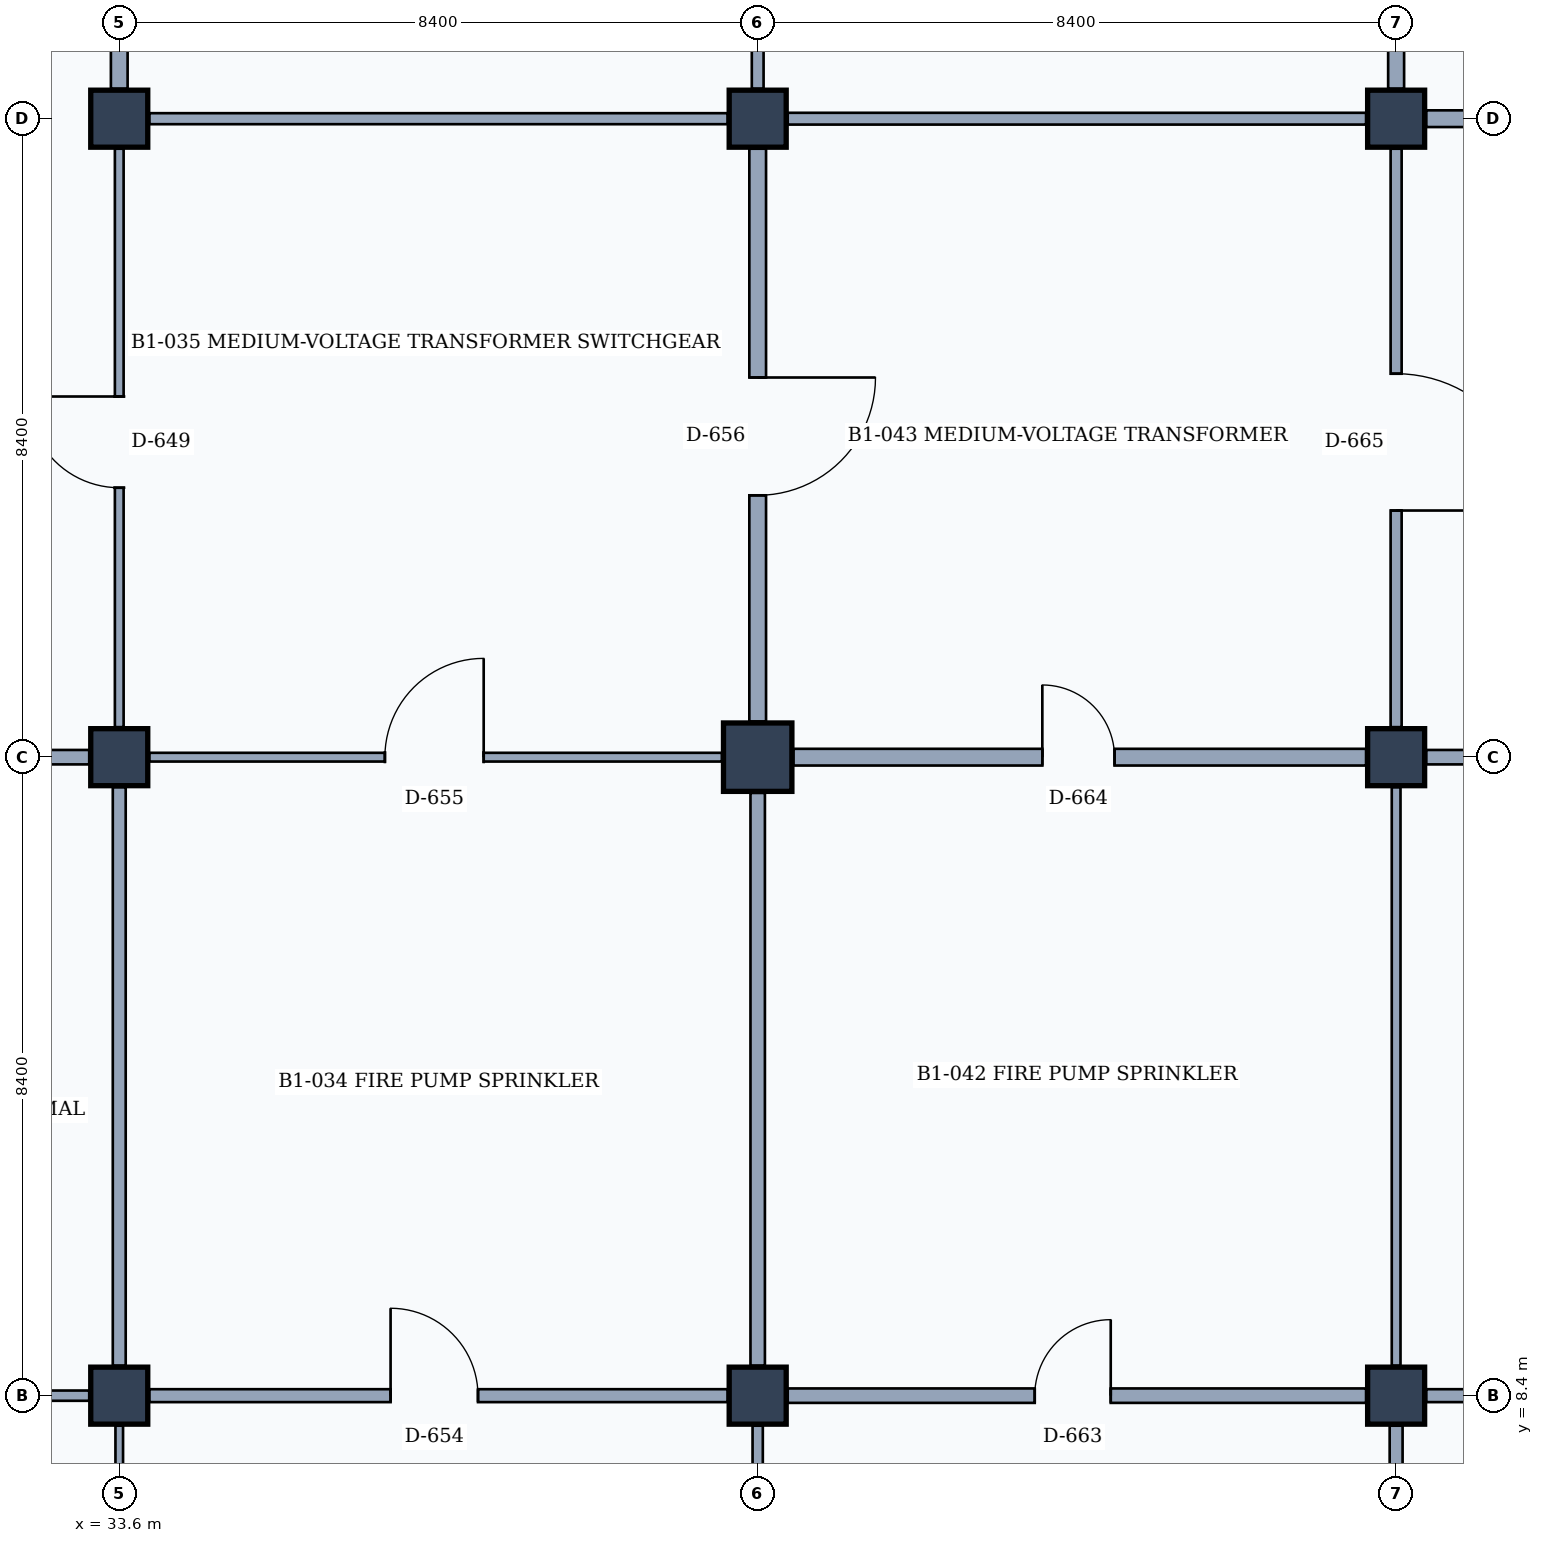
"""IFC4 building model, lengths in metres.
Left out: names, types, materials, properties, quantities, classifications, styles, units other than length and angle.
Written with IfcOpenShell. Run it as: python <this file> out.ifc"""

import sys

from ifc_helpers import new_model, si_unit, direction, frame, frame_2d, origin, origin_2d, place, context, subcontext, project, spatial, rectangle, extrude, element, fill, save


model = new_model("IFC4")
c1 = context("Model", 3, precision=1e-05, world=origin(), true_north=direction((0.0, 1.0)))
c2 = subcontext(c1, "Body", "Model", "MODEL_VIEW")
j1 = project(units=[si_unit("LENGTHUNIT", "METRE"), si_unit("PLANEANGLEUNIT", "RADIAN")], contexts=[c1])
p1 = place(None, origin())
s1 = spatial("IfcSite", under=j1, at=p1, CompositionType="ELEMENT")
p2 = place(p1, origin())
s2 = spatial("IfcBuilding", under=s1, at=p2, CompositionType="ELEMENT")
p3 = place(p2, frame((0.0, 0.0, -4.2)))
s3 = spatial("IfcBuildingStorey", under=s2, at=p3, CompositionType="ELEMENT", Elevation=-4.2)
for number, where, z_axis, x_axis in (
    (1, (33.6, 8.4, 0.0), (0.0, 0.0, 1.0), (1.0, 0.0, 0.0)),
    (2, (33.6, 16.8, 0.0), (0.0, 0.0, 1.0), (1.0, 0.0, 0.0)),
    (3, (33.6, 25.2, 0.0), (0.0, 0.0, 1.0), (1.0, 0.0, 0.0)),
    (4, (42.0, 8.4, 0.0), (0.0, 0.0, 1.0), (1.0, 0.0, 0.0)),
):
    element("IfcColumn", number, at=place(p3, frame(where, z_axis=z_axis, x_axis=x_axis)), inside=s3, PredefinedType="COLUMN", context=c2, shape_type="SweptSolid", body=[
        extrude(rectangle(XDim=0.75, YDim=0.75, at=origin_2d()), origin(), (0.0, 0.0, 1.0), 4.2),
    ])
p4 = place(p3, frame((42.0, 16.8, 0.0), z_axis=(0.0, 0.0, 1.0), x_axis=(1.0, 0.0, 0.0)))
e5 = element("IfcColumn", 5, at=p4, inside=s3, PredefinedType="COLUMN", context=c2, shape_type="SweptSolid", body=[
    extrude(rectangle(XDim=0.9, YDim=0.9, at=origin_2d()), origin(), (0.0, 0.0, 1.0), 4.2),
])
for number, where, z_axis, x_axis in (
    (6, (42.0, 25.2, 0.0), (0.0, 0.0, 1.0), (1.0, 0.0, 0.0)),
    (7, (50.4, 8.4, 0.0), (0.0, 0.0, 1.0), (1.0, 0.0, 0.0)),
    (8, (50.4, 16.8, 0.0), (0.0, 0.0, 1.0), (1.0, 0.0, 0.0)),
    (9, (50.4, 25.2, 0.0), (0.0, 0.0, 1.0), (1.0, 0.0, 0.0)),
):
    element("IfcColumn", number, at=place(p3, frame(where, z_axis=z_axis, x_axis=x_axis)), inside=s3, PredefinedType="COLUMN", context=c2, shape_type="SweptSolid", body=[
        extrude(rectangle(XDim=0.75, YDim=0.75, at=origin_2d()), origin(), (0.0, 0.0, 1.0), 4.2),
    ])
p5 = place(p3, frame((33.6, 0.345, 0.0), z_axis=(0.0, 0.0, 1.0), x_axis=(0.0, 1.0, 0.0)))
e10 = element("IfcWall", 10, at=p5, inside=s3, PredefinedType="MOVABLE", context=c2, shape_type="SweptSolid", body=[
    extrude(rectangle(XDim=7.66, YDim=0.1, at=frame_2d((3.83, 0.0))), origin(), (0.0, 0.0, 1.0), 3.25),
])
p6 = place(p3, frame((25.595, 8.4, 0.0), z_axis=(0.0, 0.0, 1.0), x_axis=(1.0, 0.0, 0.0)))
e11 = element("IfcWall", 11, at=p6, inside=s3, PredefinedType="PARTITIONING", context=c2, shape_type="SweptSolid", body=[
    extrude(rectangle(XDim=7.61, YDim=0.135, at=frame_2d((3.805, 0.0))), origin(), (0.0, 0.0, 1.0), 3.05),
])
p7 = place(p6, frame((3.275, 0.0, 0.0)))
e12 = element("IfcOpeningElement", 12, at=p7, cuts=e11, PredefinedType="OPENING", context=c2, shape_type="SweptSolid", body=[
    extrude(rectangle(XDim=0.95, YDim=2.15, at=frame_2d((0.475, 1.075))), frame((0.0, 0.077, 0.0), z_axis=(0.0, -1.0, 0.0), x_axis=(1.0, 0.0, 0.0)), (0.0, 0.0, 1.0), 0.155),
])
p8 = place(p3, frame((33.6, 8.795, 0.0), z_axis=(0.0, 0.0, 1.0), x_axis=(0.0, 1.0, 0.0)))
e13 = element("IfcWall", 13, at=p8, inside=s3, PredefinedType="PARTITIONING", context=c2, shape_type="SweptSolid", body=[
    extrude(rectangle(XDim=7.61, YDim=0.17, at=frame_2d((3.805, 0.0))), origin(), (0.0, 0.0, 1.0), 3.25),
])
p9 = place(p3, frame((25.67, 16.8, 0.0), z_axis=(0.0, 0.0, 1.0), x_axis=(1.0, 0.0, 0.0)))
e14 = element("IfcWall", 14, at=p9, inside=s3, PredefinedType="PARTITIONING", context=c2, shape_type="SweptSolid", body=[
    extrude(rectangle(XDim=7.535, YDim=0.19, at=frame_2d((3.768, 0.0))), origin(), (0.0, 0.0, 1.0), 3.05),
])
p10 = place(p9, frame((2.85, 0.0, 0.0)))
e15 = element("IfcOpeningElement", 15, at=p10, cuts=e14, PredefinedType="OPENING", context=c2, shape_type="SweptSolid", body=[
    extrude(rectangle(XDim=1.8, YDim=2.3, at=frame_2d((0.9, 1.15))), frame((0.0, 0.105, 0.0), z_axis=(0.0, -1.0, 0.0), x_axis=(1.0, 0.0, 0.0)), (0.0, 0.0, 1.0), 0.21),
])
p11 = place(p3, frame((33.6, 17.195, 0.0), z_axis=(0.0, 0.0, 1.0), x_axis=(0.0, 1.0, 0.0)))
e16 = element("IfcWall", 16, at=p11, inside=s3, PredefinedType="PARTITIONING", context=c2, shape_type="SweptSolid", body=[
    extrude(rectangle(XDim=7.61, YDim=0.115, at=frame_2d((3.805, 0.0))), origin(), (0.0, 0.0, 1.0), 3.25),
])
p12 = place(p11, frame((3.15, 0.0, 0.0)))
e17 = element("IfcOpeningElement", 17, at=p12, cuts=e16, PredefinedType="OPENING", context=c2, shape_type="SweptSolid", body=[
    extrude(rectangle(XDim=1.2, YDim=2.2, at=frame_2d((0.6, 1.1))), frame((0.0, 0.067, 0.0), z_axis=(0.0, -1.0, 0.0), x_axis=(1.0, 0.0, 0.0)), (0.0, 0.0, 1.0), 0.135),
])
p13 = place(p3, frame((33.6, 25.595, 0.0), z_axis=(0.0, 0.0, 1.0), x_axis=(0.0, 1.0, 0.0)))
e18 = element("IfcWall", 18, at=p13, inside=s3, PredefinedType="PARTITIONING", context=c2, shape_type="SweptSolid", body=[
    extrude(rectangle(XDim=7.61, YDim=0.22, at=frame_2d((3.805, 0.0))), origin(), (0.0, 0.0, 1.0), 3.25),
])
p14 = place(p13, frame((3.05, 0.0, 0.0)))
e19 = element("IfcOpeningElement", 19, at=p14, cuts=e18, PredefinedType="OPENING", context=c2, shape_type="SweptSolid", body=[
    extrude(rectangle(XDim=1.4, YDim=2.25, at=frame_2d((0.7, 1.125))), frame((0.0, 0.12, 0.0), z_axis=(0.0, -1.0, 0.0), x_axis=(1.0, 0.0, 0.0)), (0.0, 0.0, 1.0), 0.24),
])
p15 = place(p3, frame((42.0, 0.345, 0.0), z_axis=(0.0, 0.0, 1.0), x_axis=(0.0, 1.0, 0.0)))
e20 = element("IfcWall", 20, at=p15, inside=s3, PredefinedType="PARTITIONING", context=c2, shape_type="SweptSolid", body=[
    extrude(rectangle(XDim=7.66, YDim=0.135, at=frame_2d((3.83, 0.0))), origin(), (0.0, 0.0, 1.0), 3.25),
])
p16 = place(p3, frame((33.995, 8.4, 0.0), z_axis=(0.0, 0.0, 1.0), x_axis=(1.0, 0.0, 0.0)))
e21 = element("IfcWall", 21, at=p16, inside=s3, PredefinedType="PARTITIONING", context=c2, shape_type="SweptSolid", body=[
    extrude(rectangle(XDim=7.61, YDim=0.17, at=frame_2d((3.805, 0.0))), origin(), (0.0, 0.0, 1.0), 3.05),
])
p17 = place(p16, frame((3.175, 0.0, 0.0)))
e22 = element("IfcOpeningElement", 22, at=p17, cuts=e21, PredefinedType="OPENING", context=c2, shape_type="SweptSolid", body=[
    extrude(rectangle(XDim=1.15, YDim=2.25, at=frame_2d((0.575, 1.125))), frame((0.0, 0.095, 0.0), z_axis=(0.0, -1.0, 0.0), x_axis=(1.0, 0.0, 0.0)), (0.0, 0.0, 1.0), 0.19),
])
p18 = place(p3, frame((42.0, 8.795, 0.0), z_axis=(0.0, 0.0, 1.0), x_axis=(0.0, 1.0, 0.0)))
e23 = element("IfcWall", 23, at=p18, inside=s3, PredefinedType="PARTITIONING", context=c2, shape_type="SweptSolid", body=[
    extrude(rectangle(XDim=7.535, YDim=0.19, at=frame_2d((3.768, 0.0))), origin(), (0.0, 0.0, 1.0), 3.25),
])
p19 = place(p3, frame((33.995, 16.8, 0.0), z_axis=(0.0, 0.0, 1.0), x_axis=(1.0, 0.0, 0.0)))
e24 = element("IfcWall", 24, at=p19, inside=s3, PredefinedType="PARTITIONING", context=c2, shape_type="SweptSolid", body=[
    extrude(rectangle(XDim=7.535, YDim=0.115, at=frame_2d((3.768, 0.0))), origin(), (0.0, 0.0, 1.0), 3.05),
])
p20 = place(p19, frame((3.1, 0.0, 0.0)))
e25 = element("IfcOpeningElement", 25, at=p20, cuts=e24, PredefinedType="OPENING", context=c2, shape_type="SweptSolid", body=[
    extrude(rectangle(XDim=1.3, YDim=2.2, at=frame_2d((0.65, 1.1))), frame((0.0, 0.067, 0.0), z_axis=(0.0, -1.0, 0.0), x_axis=(1.0, 0.0, 0.0)), (0.0, 0.0, 1.0), 0.135),
])
p21 = place(p3, frame((42.0, 17.27, 0.0), z_axis=(0.0, 0.0, 1.0), x_axis=(0.0, 1.0, 0.0)))
e26 = element("IfcWall", 26, at=p21, inside=s3, PredefinedType="PARTITIONING", context=c2, shape_type="SweptSolid", body=[
    extrude(rectangle(XDim=7.535, YDim=0.22, at=frame_2d((3.768, 0.0))), origin(), (0.0, 0.0, 1.0), 3.25),
])
p22 = place(p21, frame((2.975, 0.0, 0.0)))
e27 = element("IfcOpeningElement", 27, at=p22, cuts=e26, PredefinedType="OPENING", context=c2, shape_type="SweptSolid", body=[
    extrude(rectangle(XDim=1.55, YDim=2.35, at=frame_2d((0.775, 1.175))), frame((0.0, 0.12, 0.0), z_axis=(0.0, -1.0, 0.0), x_axis=(1.0, 0.0, 0.0)), (0.0, 0.0, 1.0), 0.24),
])
p23 = place(p3, frame((33.995, 25.2, 0.0), z_axis=(0.0, 0.0, 1.0), x_axis=(1.0, 0.0, 0.0)))
e28 = element("IfcWall", 28, at=p23, inside=s3, PredefinedType="PARTITIONING", context=c2, shape_type="SweptSolid", body=[
    extrude(rectangle(XDim=7.61, YDim=0.145, at=frame_2d((3.805, 0.0))), origin(), (0.0, 0.0, 1.0), 3.05),
])
p24 = place(p3, frame((42.0, 25.595, 0.0), z_axis=(0.0, 0.0, 1.0), x_axis=(0.0, 1.0, 0.0)))
e29 = element("IfcWall", 29, at=p24, inside=s3, PredefinedType="PARTITIONING", context=c2, shape_type="SweptSolid", body=[
    extrude(rectangle(XDim=7.535, YDim=0.155, at=frame_2d((3.768, 0.0))), origin(), (0.0, 0.0, 1.0), 3.25),
])
p25 = place(p24, frame((2.9, 0.0, 0.0)))
e30 = element("IfcOpeningElement", 30, at=p25, cuts=e29, PredefinedType="OPENING", context=c2, shape_type="SweptSolid", body=[
    extrude(rectangle(XDim=1.7, YDim=2.3, at=frame_2d((0.85, 1.15))), frame((0.0, 0.087, 0.0), z_axis=(0.0, -1.0, 0.0), x_axis=(1.0, 0.0, 0.0)), (0.0, 0.0, 1.0), 0.175),
])
p26 = place(p3, frame((50.4, 0.345, 0.0), z_axis=(0.0, 0.0, 1.0), x_axis=(0.0, 1.0, 0.0)))
e31 = element("IfcWall", 31, at=p26, inside=s3, PredefinedType="PARTITIONING", context=c2, shape_type="SweptSolid", body=[
    extrude(rectangle(XDim=7.66, YDim=0.17, at=frame_2d((3.83, 0.0))), origin(), (0.0, 0.0, 1.0), 3.25),
])
p27 = place(p3, frame((42.395, 8.4, 0.0), z_axis=(0.0, 0.0, 1.0), x_axis=(1.0, 0.0, 0.0)))
e32 = element("IfcWall", 32, at=p27, inside=s3, PredefinedType="PARTITIONING", context=c2, shape_type="SweptSolid", body=[
    extrude(rectangle(XDim=7.61, YDim=0.19, at=frame_2d((3.805, 0.0))), origin(), (0.0, 0.0, 1.0), 3.05),
])
p28 = place(p27, frame((3.25, 0.0, 0.0)))
e33 = element("IfcOpeningElement", 33, at=p28, cuts=e32, PredefinedType="OPENING", context=c2, shape_type="SweptSolid", body=[
    extrude(rectangle(XDim=1.0, YDim=2.15, at=frame_2d((0.5, 1.075))), frame((0.0, 0.105, 0.0), z_axis=(0.0, -1.0, 0.0), x_axis=(1.0, 0.0, 0.0)), (0.0, 0.0, 1.0), 0.21),
])
p29 = place(p3, frame((50.4, 8.795, 0.0), z_axis=(0.0, 0.0, 1.0), x_axis=(0.0, 1.0, 0.0)))
e34 = element("IfcWall", 34, at=p29, inside=s3, PredefinedType="PARTITIONING", context=c2, shape_type="SweptSolid", body=[
    extrude(rectangle(XDim=7.61, YDim=0.115, at=frame_2d((3.805, 0.0))), origin(), (0.0, 0.0, 1.0), 3.25),
])
p30 = place(p3, frame((42.47, 16.8, 0.0), z_axis=(0.0, 0.0, 1.0), x_axis=(1.0, 0.0, 0.0)))
e35 = element("IfcWall", 35, at=p30, inside=s3, PredefinedType="PARTITIONING", context=c2, shape_type="SweptSolid", body=[
    extrude(rectangle(XDim=7.535, YDim=0.22, at=frame_2d((3.768, 0.0))), origin(), (0.0, 0.0, 1.0), 3.05),
])
p31 = place(p30, frame((3.275, 0.0, 0.0)))
e36 = element("IfcOpeningElement", 36, at=p31, cuts=e35, PredefinedType="OPENING", context=c2, shape_type="SweptSolid", body=[
    extrude(rectangle(XDim=0.95, YDim=2.15, at=frame_2d((0.475, 1.075))), frame((0.0, 0.12, 0.0), z_axis=(0.0, -1.0, 0.0), x_axis=(1.0, 0.0, 0.0)), (0.0, 0.0, 1.0), 0.24),
])
p32 = place(p3, frame((50.4, 17.195, 0.0), z_axis=(0.0, 0.0, 1.0), x_axis=(0.0, 1.0, 0.0)))
e37 = element("IfcWall", 37, at=p32, inside=s3, PredefinedType="PARTITIONING", context=c2, shape_type="SweptSolid", body=[
    extrude(rectangle(XDim=7.61, YDim=0.145, at=frame_2d((3.805, 0.0))), origin(), (0.0, 0.0, 1.0), 3.25),
])
p33 = place(p32, frame((2.85, 0.0, 0.0)))
e38 = element("IfcOpeningElement", 38, at=p33, cuts=e37, PredefinedType="OPENING", context=c2, shape_type="SweptSolid", body=[
    extrude(rectangle(XDim=1.8, YDim=2.3, at=frame_2d((0.9, 1.15))), frame((0.0, 0.083, 0.0), z_axis=(0.0, -1.0, 0.0), x_axis=(1.0, 0.0, 0.0)), (0.0, 0.0, 1.0), 0.165),
])
p34 = place(p3, frame((42.395, 25.2, 0.0), z_axis=(0.0, 0.0, 1.0), x_axis=(1.0, 0.0, 0.0)))
e39 = element("IfcWall", 39, at=p34, inside=s3, PredefinedType="PARTITIONING", context=c2, shape_type="SweptSolid", body=[
    extrude(rectangle(XDim=7.61, YDim=0.155, at=frame_2d((3.805, 0.0))), origin(), (0.0, 0.0, 1.0), 3.05),
])
p35 = place(p3, frame((50.4, 25.595, 0.0), z_axis=(0.0, 0.0, 1.0), x_axis=(0.0, 1.0, 0.0)))
e40 = element("IfcWall", 40, at=p35, inside=s3, PredefinedType="PARTITIONING", context=c2, shape_type="SweptSolid", body=[
    extrude(rectangle(XDim=7.61, YDim=0.21, at=frame_2d((3.805, 0.0))), origin(), (0.0, 0.0, 1.0), 3.25),
])
p36 = place(p3, frame((50.795, 8.4, 0.0), z_axis=(0.0, 0.0, 1.0), x_axis=(1.0, 0.0, 0.0)))
e41 = element("IfcWall", 41, at=p36, inside=s3, PredefinedType="PARTITIONING", context=c2, shape_type="SweptSolid", body=[
    extrude(rectangle(XDim=7.66, YDim=0.17, at=frame_2d((3.83, 0.0))), origin(), (0.0, 0.0, 1.0), 2.95),
])
p37 = place(p36, frame((3.225, 0.0, 0.0)))
e42 = element("IfcOpeningElement", 42, at=p37, cuts=e41, PredefinedType="OPENING", context=c2, shape_type="SweptSolid", body=[
    extrude(rectangle(XDim=1.05, YDim=2.2, at=frame_2d((0.525, 1.1))), frame((0.0, 0.095, 0.0), z_axis=(0.0, -1.0, 0.0), x_axis=(1.0, 0.0, 0.0)), (0.0, 0.0, 1.0), 0.19),
])
p38 = place(p3, frame((50.795, 16.8, 0.0), z_axis=(0.0, 0.0, 1.0), x_axis=(1.0, 0.0, 0.0)))
e43 = element("IfcWall", 43, at=p38, inside=s3, PredefinedType="PARTITIONING", context=c2, shape_type="SweptSolid", body=[
    extrude(rectangle(XDim=7.66, YDim=0.19, at=frame_2d((3.83, 0.0))), origin(), (0.0, 0.0, 1.0), 2.95),
])
p39 = place(p38, frame((3.175, 0.0, 0.0)))
e44 = element("IfcOpeningElement", 44, at=p39, cuts=e43, PredefinedType="OPENING", context=c2, shape_type="SweptSolid", body=[
    extrude(rectangle(XDim=1.15, YDim=2.25, at=frame_2d((0.575, 1.125))), frame((0.0, 0.105, 0.0), z_axis=(0.0, -1.0, 0.0), x_axis=(1.0, 0.0, 0.0)), (0.0, 0.0, 1.0), 0.21),
])
p40 = place(p3, frame((50.795, 25.2, 0.0), z_axis=(0.0, 0.0, 1.0), x_axis=(1.0, 0.0, 0.0)))
e45 = element("IfcWall", 45, at=p40, inside=s3, PredefinedType="PARTITIONING", context=c2, shape_type="SweptSolid", body=[
    extrude(rectangle(XDim=7.66, YDim=0.22, at=frame_2d((3.83, 0.0))), origin(), (0.0, 0.0, 1.0), 2.95),
])
p41 = place(p12, origin())
e46 = element("IfcDoor", 46, at=p41, inside=s3, OperationType="SINGLE_SWING_RIGHT", PredefinedType="DOOR", context=c2, shape_type="SweptSolid", body=[
    extrude(rectangle(XDim=1.2, YDim=2.2, at=frame_2d((0.6, 1.1))), frame((0.0, 0.025, 0.0), z_axis=(0.0, -1.0, 0.0), x_axis=(1.0, 0.0, 0.0)), (0.0, 0.0, 1.0), 0.05),
])
fill(e17, e46)
p42 = place(p17, origin())
e47 = element("IfcDoor", 47, at=p42, inside=s3, OperationType="SINGLE_SWING_LEFT", PredefinedType="DOOR", context=c2, shape_type="SweptSolid", body=[
    extrude(rectangle(XDim=1.15, YDim=2.25, at=frame_2d((0.575, 1.125))), frame((0.0, 0.025, 0.0), z_axis=(0.0, -1.0, 0.0), x_axis=(1.0, 0.0, 0.0)), (0.0, 0.0, 1.0), 0.05),
])
fill(e22, e47)
p43 = place(p20, origin())
e48 = element("IfcDoor", 48, at=p43, inside=s3, OperationType="SINGLE_SWING_RIGHT", PredefinedType="DOOR", context=c2, shape_type="SweptSolid", body=[
    extrude(rectangle(XDim=1.3, YDim=2.2, at=frame_2d((0.65, 1.1))), frame((0.0, 0.025, 0.0), z_axis=(0.0, -1.0, 0.0), x_axis=(1.0, 0.0, 0.0)), (0.0, 0.0, 1.0), 0.05),
])
fill(e25, e48)
p44 = place(p22, frame((1.55, 0.0, 0.0), z_axis=(0.0, 0.0, 1.0), x_axis=(-1.0, 0.0, 0.0)))
e49 = element("IfcDoor", 49, at=p44, inside=s3, OperationType="SINGLE_SWING_LEFT", PredefinedType="DOOR", context=c2, shape_type="SweptSolid", body=[
    extrude(rectangle(XDim=1.55, YDim=2.35, at=frame_2d((0.775, 1.175))), frame((0.0, 0.025, 0.0), z_axis=(0.0, -1.0, 0.0), x_axis=(1.0, 0.0, 0.0)), (0.0, 0.0, 1.0), 0.05),
])
fill(e27, e49)
p45 = place(p28, origin())
e50 = element("IfcDoor", 50, at=p45, inside=s3, OperationType="SINGLE_SWING_RIGHT", PredefinedType="DOOR", context=c2, shape_type="SweptSolid", body=[
    extrude(rectangle(XDim=1.0, YDim=2.15, at=frame_2d((0.5, 1.075))), frame((0.0, 0.025, 0.0), z_axis=(0.0, -1.0, 0.0), x_axis=(1.0, 0.0, 0.0)), (0.0, 0.0, 1.0), 0.05),
])
fill(e33, e50)
p46 = place(p31, origin())
e51 = element("IfcDoor", 51, at=p46, inside=s3, OperationType="SINGLE_SWING_LEFT", PredefinedType="DOOR", context=c2, shape_type="SweptSolid", body=[
    extrude(rectangle(XDim=0.95, YDim=2.15, at=frame_2d((0.475, 1.075))), frame((0.0, 0.025, 0.0), z_axis=(0.0, -1.0, 0.0), x_axis=(1.0, 0.0, 0.0)), (0.0, 0.0, 1.0), 0.05),
])
fill(e36, e51)
p47 = place(p33, frame((1.8, 0.0, 0.0), z_axis=(0.0, 0.0, 1.0), x_axis=(-1.0, 0.0, 0.0)))
e52 = element("IfcDoor", 52, at=p47, inside=s3, OperationType="SINGLE_SWING_RIGHT", PredefinedType="DOOR", context=c2, shape_type="SweptSolid", body=[
    extrude(rectangle(XDim=1.8, YDim=2.3, at=frame_2d((0.9, 1.15))), frame((0.0, 0.025, 0.0), z_axis=(0.0, -1.0, 0.0), x_axis=(1.0, 0.0, 0.0)), (0.0, 0.0, 1.0), 0.05),
])
fill(e38, e52)
save(model, sys.argv[1])
